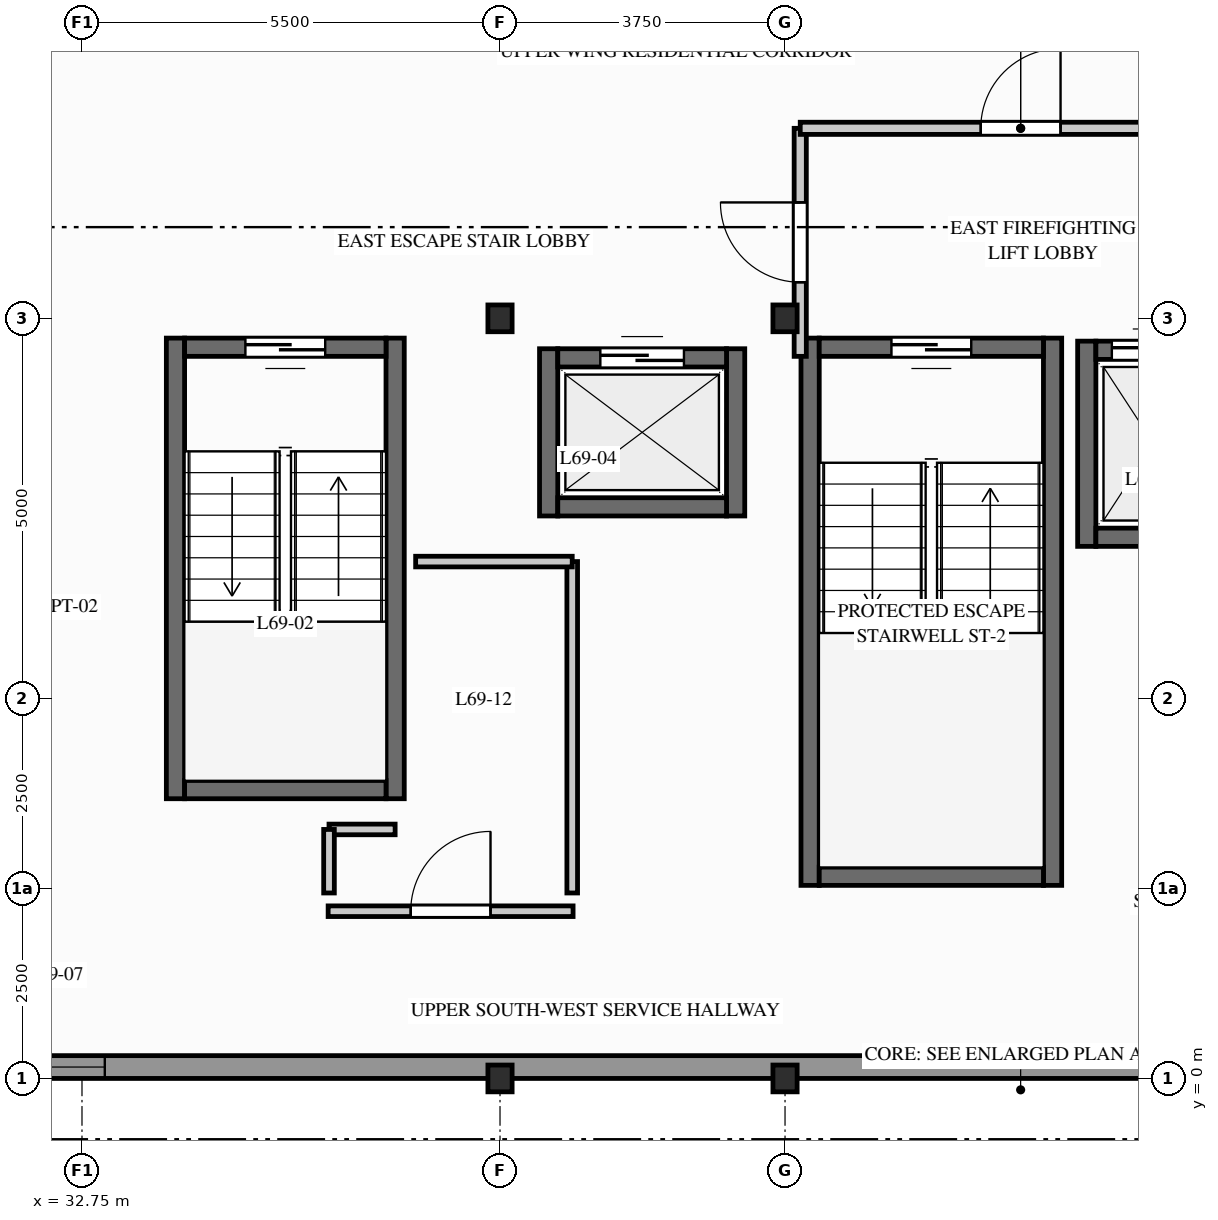
"""IFC4 building model, lengths in metres.
Left out: names, types, materials, properties, quantities, classifications, styles, units other than length and angle.
Written with IfcOpenShell. Run it as: python <this file> out.ifc"""

import sys

from ifc_helpers import new_model, si_unit, direction, frame, frame_2d, origin, origin_2d, place, context, subcontext, project, spatial, rectangle, i_section, extrude, element, fill, save


model = new_model("IFC4")
c1 = context("Model", 3, precision=1e-05, world=origin(), true_north=direction((0.0, 1.0)))
c2 = subcontext(c1, "Body", "Model", "MODEL_VIEW")
j1 = project(units=[si_unit("LENGTHUNIT", "METRE"), si_unit("PLANEANGLEUNIT", "RADIAN")], contexts=[c1])
p1 = place(None, origin())
s1 = spatial("IfcSite", under=j1, at=p1, CompositionType="ELEMENT")
p2 = place(p1, origin())
s2 = spatial("IfcBuilding", under=s1, at=p2, CompositionType="ELEMENT")
p3 = place(p2, frame((0.0, 0.0, 227.3)))
s3 = spatial("IfcBuildingStorey", under=s2, at=p3, CompositionType="ELEMENT", Elevation=227.3)
for number, where, z_axis, x_axis in (
    (1, (38.25, 0.0, 0.0), (0.0, 0.0, 1.0), (1.0, 0.0, 0.0)),
    (2, (38.25, 10.0, 0.0), (0.0, 0.0, 1.0), (1.0, 0.0, 0.0)),
    (3, (42.0, 0.0, 0.0), (0.0, 0.0, 1.0), (1.0, 0.0, 0.0)),
    (4, (42.0, 10.0, 0.0), (0.0, 0.0, 1.0), (1.0, 0.0, 0.0)),
):
    element("IfcColumn", number, at=place(p3, frame(where, z_axis=z_axis, x_axis=x_axis)), inside=s3, PredefinedType="COLUMN", context=c2, shape_type="SweptSolid", body=[
        extrude(i_section(OverallWidth=0.318, OverallDepth=0.353, WebThickness=0.023, FlangeThickness=0.038, FilletRadius=0.015, at=origin_2d()), origin(), (0.0, 0.0, 1.0), 3.1),
    ])
p4 = place(p3, frame((29.75, 0.15, 0.0), z_axis=(0.0, 0.0, 1.0), x_axis=(1.0, 0.0, 0.0)))
e5 = element("IfcWall", 5, at=p4, inside=s3, PredefinedType="STANDARD", context=c2, shape_type="SweptSolid", body=[
    extrude(rectangle(XDim=27.75, YDim=0.3, at=frame_2d((13.875, 0.0))), origin(), (0.0, 0.0, 1.0), 2.332),
])
p5 = place(p4, frame((2.5, 0.0, 0.712)))
e6 = element("IfcOpeningElement", 6, at=p5, cuts=e5, PredefinedType="OPENING", context=c2, shape_type="SweptSolid", body=[
    extrude(rectangle(XDim=0.8, YDim=1.4, at=frame_2d((0.4, 0.7))), frame((0.0, 0.16, 0.0), z_axis=(0.0, -1.0, 0.0), x_axis=(1.0, 0.0, 0.0)), (0.0, 0.0, 1.0), 0.32),
])
p6 = place(p4, frame((21.25, 0.0, 0.312)))
e7 = element("IfcOpeningElement", 7, at=p6, cuts=e5, PredefinedType="OPENING", context=c2, shape_type="SweptSolid", body=[
    extrude(rectangle(XDim=1.5, YDim=1.8, at=frame_2d((0.75, 0.9))), frame((0.0, 0.16, 0.0), z_axis=(0.0, -1.0, 0.0), x_axis=(1.0, 0.0, 0.0)), (0.0, 0.0, 1.0), 0.32),
])
for number, where, z_axis, x_axis in (
    (8, (42.33, 2.54, 0.0), (0.0, 0.0, 1.0), (0.0, 1.0, 0.0)),
    (9, (45.52, 2.54, 0.0), (0.0, 0.0, 1.0), (0.0, 1.0, 0.0)),
):
    element("IfcWall", number, at=place(p3, frame(where, z_axis=z_axis, x_axis=x_axis)), inside=s3, PredefinedType="SHEAR", context=c2, shape_type="SweptSolid", body=[
        extrude(rectangle(XDim=7.2, YDim=0.24, at=frame_2d((3.6, 0.0))), origin(), (0.0, 0.0, 1.0), 2.89),
    ])
p7 = place(p3, frame((42.45, 2.66, 0.0), z_axis=(0.0, 0.0, 1.0), x_axis=(1.0, 0.0, 0.0)))
e10 = element("IfcWall", 10, at=p7, inside=s3, PredefinedType="SHEAR", context=c2, shape_type="SweptSolid", body=[
    extrude(rectangle(XDim=2.95, YDim=0.24, at=frame_2d((1.475, 0.0))), origin(), (0.0, 0.0, 1.0), 2.89),
])
p8 = place(p3, frame((45.4, 9.62, 0.0), z_axis=(0.0, 0.0, 1.0), x_axis=(-1.0, 0.0, 0.0)))
e11 = element("IfcWall", 11, at=p8, inside=s3, PredefinedType="SHEAR", context=c2, shape_type="SweptSolid", body=[
    extrude(rectangle(XDim=2.95, YDim=0.24, at=frame_2d((1.475, 0.0))), origin(), (0.0, 0.0, 1.0), 2.89),
])
p9 = place(p8, frame((0.95, 0.0, 0.0)))
e12 = element("IfcOpeningElement", 12, at=p9, cuts=e11, PredefinedType="OPENING", context=c2, shape_type="SweptSolid", body=[
    extrude(rectangle(XDim=1.05, YDim=2.06, at=frame_2d((0.525, 1.03))), frame((0.0, 0.13, 0.0), z_axis=(0.0, -1.0, 0.0), x_axis=(1.0, 0.0, 0.0)), (0.0, 0.0, 1.0), 0.26),
])
for number, where, z_axis, x_axis in (
    (13, (33.98, 3.68, 0.0), (0.0, 0.0, 1.0), (0.0, 1.0, 0.0)),
    (14, (36.87, 3.68, 0.0), (0.0, 0.0, 1.0), (0.0, 1.0, 0.0)),
):
    element("IfcWall", number, at=place(p3, frame(where, z_axis=z_axis, x_axis=x_axis)), inside=s3, PredefinedType="SHEAR", context=c2, shape_type="SweptSolid", body=[
        extrude(rectangle(XDim=6.06, YDim=0.24, at=frame_2d((3.03, 0.0))), origin(), (0.0, 0.0, 1.0), 2.89),
    ])
p10 = place(p3, frame((34.1, 3.8, 0.0), z_axis=(0.0, 0.0, 1.0), x_axis=(1.0, 0.0, 0.0)))
e15 = element("IfcWall", 15, at=p10, inside=s3, PredefinedType="SHEAR", context=c2, shape_type="SweptSolid", body=[
    extrude(rectangle(XDim=2.65, YDim=0.24, at=frame_2d((1.325, 0.0))), origin(), (0.0, 0.0, 1.0), 2.89),
])
p11 = place(p3, frame((36.75, 9.62, 0.0), z_axis=(0.0, 0.0, 1.0), x_axis=(-1.0, 0.0, 0.0)))
e16 = element("IfcWall", 16, at=p11, inside=s3, PredefinedType="SHEAR", context=c2, shape_type="SweptSolid", body=[
    extrude(rectangle(XDim=2.65, YDim=0.24, at=frame_2d((1.325, 0.0))), origin(), (0.0, 0.0, 1.0), 2.89),
])
p12 = place(p11, frame((0.8, 0.0, 0.0)))
e17 = element("IfcOpeningElement", 17, at=p12, cuts=e16, PredefinedType="OPENING", context=c2, shape_type="SweptSolid", body=[
    extrude(rectangle(XDim=1.05, YDim=2.06, at=frame_2d((0.525, 1.03))), frame((0.0, 0.13, 0.0), z_axis=(0.0, -1.0, 0.0), x_axis=(1.0, 0.0, 0.0)), (0.0, 0.0, 1.0), 0.26),
])
p13 = place(p3, frame((45.97, 7.0, 0.0), z_axis=(0.0, 0.0, 1.0), x_axis=(0.0, 1.0, 0.0)))
e18 = element("IfcWall", 18, at=p13, inside=s3, PredefinedType="SHEAR", context=c2, shape_type="SweptSolid", body=[
    extrude(rectangle(XDim=2.7, YDim=0.24, at=frame_2d((1.35, 0.0))), origin(), (0.0, 0.0, 1.0), 2.89),
])
p14 = place(p3, frame((46.09, 7.12, 0.0), z_axis=(0.0, 0.0, 1.0), x_axis=(1.0, 0.0, 0.0)))
e19 = element("IfcWall", 19, at=p14, inside=s3, PredefinedType="SHEAR", context=c2, shape_type="SweptSolid", body=[
    extrude(rectangle(XDim=1.52, YDim=0.24, at=frame_2d((0.76, 0.0))), origin(), (0.0, 0.0, 1.0), 2.89),
])
p15 = place(p3, frame((46.09, 9.58, 0.0), z_axis=(0.0, 0.0, 1.0), x_axis=(1.0, 0.0, 0.0)))
e20 = element("IfcWall", 20, at=p15, inside=s3, PredefinedType="SHEAR", context=c2, shape_type="SweptSolid", body=[
    extrude(rectangle(XDim=1.52, YDim=0.24, at=frame_2d((0.76, 0.0))), origin(), (0.0, 0.0, 1.0), 2.89),
])
p16 = place(p15, frame((0.21, 0.0, 0.0)))
e21 = element("IfcOpeningElement", 21, at=p16, cuts=e20, PredefinedType="OPENING", context=c2, shape_type="SweptSolid", body=[
    extrude(rectangle(XDim=1.1, YDim=2.06, at=frame_2d((0.55, 1.03))), frame((0.0, 0.13, 0.0), z_axis=(0.0, -1.0, 0.0), x_axis=(1.0, 0.0, 0.0)), (0.0, 0.0, 1.0), 0.26),
])
for number, where, z_axis, x_axis in (
    (22, (38.89, 7.4, 0.0), (0.0, 0.0, 1.0), (0.0, 1.0, 0.0)),
    (23, (41.35, 7.4, 0.0), (0.0, 0.0, 1.0), (0.0, 1.0, 0.0)),
):
    element("IfcWall", number, at=place(p3, frame(where, z_axis=z_axis, x_axis=x_axis)), inside=s3, PredefinedType="SHEAR", context=c2, shape_type="SweptSolid", body=[
        extrude(rectangle(XDim=2.2, YDim=0.24, at=frame_2d((1.1, 0.0))), origin(), (0.0, 0.0, 1.0), 2.89),
    ])
p17 = place(p3, frame((39.01, 7.52, 0.0), z_axis=(0.0, 0.0, 1.0), x_axis=(1.0, 0.0, 0.0)))
e24 = element("IfcWall", 24, at=p17, inside=s3, PredefinedType="SHEAR", context=c2, shape_type="SweptSolid", body=[
    extrude(rectangle(XDim=2.22, YDim=0.24, at=frame_2d((1.11, 0.0))), origin(), (0.0, 0.0, 1.0), 2.89),
])
p18 = place(p3, frame((39.01, 9.48, 0.0), z_axis=(0.0, 0.0, 1.0), x_axis=(1.0, 0.0, 0.0)))
e25 = element("IfcWall", 25, at=p18, inside=s3, PredefinedType="SHEAR", context=c2, shape_type="SweptSolid", body=[
    extrude(rectangle(XDim=2.22, YDim=0.24, at=frame_2d((1.11, 0.0))), origin(), (0.0, 0.0, 1.0), 2.89),
])
p19 = place(p18, frame((0.56, 0.0, 0.0)))
e26 = element("IfcOpeningElement", 26, at=p19, cuts=e25, PredefinedType="OPENING", context=c2, shape_type="SweptSolid", body=[
    extrude(rectangle(XDim=1.1, YDim=2.06, at=frame_2d((0.55, 1.03))), frame((0.0, 0.13, 0.0), z_axis=(0.0, -1.0, 0.0), x_axis=(1.0, 0.0, 0.0)), (0.0, 0.0, 1.0), 0.26),
])
p20 = place(p3, frame((35.989, 2.2, 0.0), z_axis=(0.0, 0.0, 1.0), x_axis=(1.0, 0.0, 0.0)))
e27 = element("IfcWall", 27, at=p20, inside=s3, PredefinedType="PARTITIONING", context=c2, shape_type="SweptSolid", body=[
    extrude(rectangle(XDim=3.222, YDim=0.14, at=frame_2d((1.611, 0.0))), origin(), (0.0, 0.0, 1.0), 2.325),
])
p21 = place(p20, frame((1.086, 0.0, 0.0)))
e28 = element("IfcOpeningElement", 28, at=p21, cuts=e27, PredefinedType="OPENING", context=c2, shape_type="SweptSolid", body=[
    extrude(rectangle(XDim=1.05, YDim=2.06, at=frame_2d((0.525, 1.03))), frame((0.0, 0.08, 0.0), z_axis=(0.0, -1.0, 0.0), x_axis=(1.0, 0.0, 0.0)), (0.0, 0.0, 1.0), 0.16),
])
p22 = place(p3, frame((42.2, 9.5, 0.0), z_axis=(0.0, 0.0, 1.0), x_axis=(0.0, 1.0, 0.0)))
e29 = element("IfcWall", 29, at=p22, inside=s3, PredefinedType="PARTITIONING", context=c2, shape_type="SweptSolid", body=[
    extrude(rectangle(XDim=3.0, YDim=0.16, at=frame_2d((1.5, 0.0))), origin(), (0.0, 0.0, 1.0), 2.325),
])
p23 = place(p22, frame((0.975, 0.0, 0.0)))
e30 = element("IfcOpeningElement", 30, at=p23, cuts=e29, PredefinedType="OPENING", context=c2, shape_type="SweptSolid", body=[
    extrude(rectangle(XDim=1.05, YDim=2.06, at=frame_2d((0.525, 1.03))), frame((0.0, 0.09, 0.0), z_axis=(0.0, -1.0, 0.0), x_axis=(1.0, 0.0, 0.0)), (0.0, 0.0, 1.0), 0.18),
])
p24 = place(p3, frame((42.2, 12.5, 0.0), z_axis=(0.0, 0.0, 1.0), x_axis=(1.0, 0.0, 0.0)))
e31 = element("IfcWall", 31, at=p24, inside=s3, PredefinedType="PARTITIONING", context=c2, shape_type="SweptSolid", body=[
    extrude(rectangle(XDim=5.8, YDim=0.16, at=frame_2d((2.9, 0.0))), origin(), (0.0, 0.0, 1.0), 2.325),
])
p25 = place(p24, frame((2.375, 0.0, 0.0)))
e32 = element("IfcOpeningElement", 32, at=p25, cuts=e31, PredefinedType="OPENING", context=c2, shape_type="SweptSolid", body=[
    extrude(rectangle(XDim=1.05, YDim=2.06, at=frame_2d((0.525, 1.03))), frame((0.0, 0.09, 0.0), z_axis=(0.0, -1.0, 0.0), x_axis=(1.0, 0.0, 0.0)), (0.0, 0.0, 1.0), 0.18),
])
p26 = place(p3, frame((39.2, 2.44, 0.0), z_axis=(0.0, 0.0, 1.0), x_axis=(0.0, 1.0, 0.0)))
e33 = element("IfcWall", 33, at=p26, inside=s3, PredefinedType="PARTITIONING", context=c2, shape_type="SweptSolid", body=[
    extrude(rectangle(XDim=4.36, YDim=0.14, at=frame_2d((2.18, 0.0))), origin(), (0.0, 0.0, 1.0), 2.89),
])
p27 = place(p3, frame((37.14, 6.8, 0.0), z_axis=(0.0, 0.0, 1.0), x_axis=(1.0, 0.0, 0.0)))
e34 = element("IfcWall", 34, at=p27, inside=s3, PredefinedType="PARTITIONING", context=c2, shape_type="SweptSolid", body=[
    extrude(rectangle(XDim=2.06, YDim=0.14, at=frame_2d((1.03, 0.0))), origin(), (0.0, 0.0, 1.0), 2.325),
])
p28 = place(p3, frame((36.0, 3.276, 0.0), z_axis=(0.0, 0.0, 1.0), x_axis=(1.0, 0.0, 0.0)))
e35 = element("IfcWall", 35, at=p28, inside=s3, PredefinedType="PARTITIONING", context=c2, shape_type="SweptSolid", body=[
    extrude(rectangle(XDim=0.87, YDim=0.14, at=frame_2d((0.435, 0.0))), origin(), (0.0, 0.0, 1.0), 2.89),
])
p29 = place(p3, frame((36.0, 2.44, 0.0), z_axis=(0.0, 0.0, 1.0), x_axis=(0.0, 1.0, 0.0)))
e36 = element("IfcWall", 36, at=p29, inside=s3, PredefinedType="PARTITIONING", context=c2, shape_type="SweptSolid", body=[
    extrude(rectangle(XDim=0.836, YDim=0.14, at=frame_2d((0.418, 0.0))), origin(), (0.0, 0.0, 1.0), 2.89),
])
p30 = place(p5, origin())
e37 = element("IfcWindow", 37, at=p30, inside=s3, PartitioningType="SINGLE_PANEL", PredefinedType="WINDOW", context=c2, shape_type="SweptSolid", body=[
    extrude(rectangle(XDim=0.8, YDim=1.4, at=frame_2d((0.4, 0.7))), frame((0.0, 0.03, 0.0), z_axis=(0.0, -1.0, 0.0), x_axis=(1.0, 0.0, 0.0)), (0.0, 0.0, 1.0), 0.06),
])
fill(e6, e37)
p31 = place(p9, origin())
e38 = element("IfcDoor", 38, at=p31, inside=s3, OperationType="SINGLE_SWING_RIGHT", PredefinedType="DOOR", context=c2, shape_type="SweptSolid", body=[
    extrude(rectangle(XDim=1.05, YDim=2.06, at=frame_2d((0.525, 1.03))), frame((0.0, 0.025, 0.0), z_axis=(0.0, -1.0, 0.0), x_axis=(1.0, 0.0, 0.0)), (0.0, 0.0, 1.0), 0.05),
])
fill(e12, e38)
p32 = place(p12, origin())
e39 = element("IfcDoor", 39, at=p32, inside=s3, OperationType="SINGLE_SWING_RIGHT", PredefinedType="DOOR", context=c2, shape_type="SweptSolid", body=[
    extrude(rectangle(XDim=1.05, YDim=2.06, at=frame_2d((0.525, 1.03))), frame((0.0, 0.025, 0.0), z_axis=(0.0, -1.0, 0.0), x_axis=(1.0, 0.0, 0.0)), (0.0, 0.0, 1.0), 0.05),
])
fill(e17, e39)
p33 = place(p16, origin())
e40 = element("IfcDoor", 40, at=p33, inside=s3, OperationType="SLIDING_TO_RIGHT", PredefinedType="DOOR", context=c2, shape_type="SweptSolid", body=[
    extrude(rectangle(XDim=1.1, YDim=2.06, at=frame_2d((0.55, 1.03))), frame((0.0, 0.025, 0.0), z_axis=(0.0, -1.0, 0.0), x_axis=(1.0, 0.0, 0.0)), (0.0, 0.0, 1.0), 0.05),
])
fill(e21, e40)
p34 = place(p19, origin())
e41 = element("IfcDoor", 41, at=p34, inside=s3, OperationType="SLIDING_TO_LEFT", PredefinedType="DOOR", context=c2, shape_type="SweptSolid", body=[
    extrude(rectangle(XDim=1.1, YDim=2.06, at=frame_2d((0.55, 1.03))), frame((0.0, 0.025, 0.0), z_axis=(0.0, -1.0, 0.0), x_axis=(1.0, 0.0, 0.0)), (0.0, 0.0, 1.0), 0.05),
])
fill(e26, e41)
p35 = place(p21, origin())
e42 = element("IfcDoor", 42, at=p35, inside=s3, OperationType="SINGLE_SWING_RIGHT", PredefinedType="DOOR", context=c2, shape_type="SweptSolid", body=[
    extrude(rectangle(XDim=1.05, YDim=2.06, at=frame_2d((0.525, 1.03))), frame((0.0, 0.025, 0.0), z_axis=(0.0, -1.0, 0.0), x_axis=(1.0, 0.0, 0.0)), (0.0, 0.0, 1.0), 0.05),
])
fill(e28, e42)
p36 = place(p23, origin())
e43 = element("IfcDoor", 43, at=p36, inside=s3, OperationType="SINGLE_SWING_RIGHT", PredefinedType="DOOR", context=c2, shape_type="SweptSolid", body=[
    extrude(rectangle(XDim=1.05, YDim=2.06, at=frame_2d((0.525, 1.03))), frame((0.0, 0.025, 0.0), z_axis=(0.0, -1.0, 0.0), x_axis=(1.0, 0.0, 0.0)), (0.0, 0.0, 1.0), 0.05),
])
fill(e30, e43)
p37 = place(p25, origin())
e44 = element("IfcDoor", 44, at=p37, inside=s3, OperationType="SINGLE_SWING_RIGHT", PredefinedType="DOOR", context=c2, shape_type="SweptSolid", body=[
    extrude(rectangle(XDim=1.05, YDim=2.06, at=frame_2d((0.525, 1.03))), frame((0.0, 0.025, 0.0), z_axis=(0.0, -1.0, 0.0), x_axis=(1.0, 0.0, 0.0)), (0.0, 0.0, 1.0), 0.05),
])
fill(e32, e44)
save(model, sys.argv[1])
